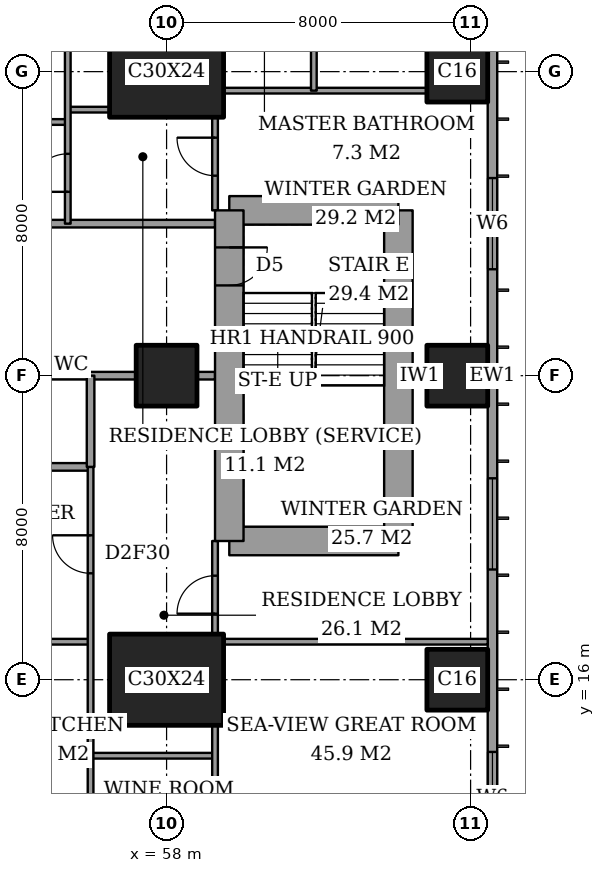
"""IFC4 building model, lengths in metres.
Left out: names, types, materials, properties, quantities, classifications, styles, units other than length and angle.
Written with IfcOpenShell. Run it as: python <this file> out.ifc"""

import sys

from ifc_helpers import new_model, si_unit, direction, frame, frame_2d, origin, origin_2d, place, context, subcontext, project, spatial, rectangle, extrude, element, fill, save


model = new_model("IFC4")
c1 = context("Model", 3, precision=1e-05, world=origin(), true_north=direction((0.0, 1.0)))
c2 = subcontext(c1, "Body", "Model", "MODEL_VIEW")
j1 = project(units=[si_unit("LENGTHUNIT", "METRE"), si_unit("PLANEANGLEUNIT", "RADIAN")], contexts=[c1])
p1 = place(None, origin())
s1 = spatial("IfcSite", under=j1, at=p1, CompositionType="ELEMENT")
p2 = place(p1, origin())
s2 = spatial("IfcBuilding", under=s1, at=p2, CompositionType="ELEMENT")
p3 = place(p2, frame((0.0, 0.0, 273.6)))
s3 = spatial("IfcBuildingStorey", under=s2, at=p3, CompositionType="ELEMENT", Elevation=273.6)
p4 = place(p3, frame((58.0, 16.0, 0.0), z_axis=(0.0, 0.0, 1.0), x_axis=(1.0, 0.0, 0.0)))
e1 = element("IfcColumn", 1, at=p4, inside=s3, PredefinedType="COLUMN", context=c2, shape_type="SweptSolid", body=[
    extrude(rectangle(XDim=3.0, YDim=2.4, at=origin_2d()), origin(), (0.0, 0.0, 1.0), 3.6),
])
p5 = place(p3, frame((58.0, 24.0, 0.0), z_axis=(0.0, 0.0, 1.0), x_axis=(1.0, 0.0, 0.0)))
e2 = element("IfcColumn", 2, at=p5, inside=s3, PredefinedType="COLUMN", context=c2, shape_type="SweptSolid", body=[
    extrude(rectangle(XDim=1.6, YDim=1.6, at=origin_2d()), origin(), (0.0, 0.0, 1.0), 3.6),
])
p6 = place(p3, frame((58.0, 32.0, 0.0), z_axis=(0.0, 0.0, 1.0), x_axis=(1.0, 0.0, 0.0)))
e3 = element("IfcColumn", 3, at=p6, inside=s3, PredefinedType="COLUMN", context=c2, shape_type="SweptSolid", body=[
    extrude(rectangle(XDim=3.0, YDim=2.4, at=origin_2d()), origin(), (0.0, 0.0, 1.0), 3.6),
])
for number, where, z_axis, x_axis in (
    (4, (65.65, 16.0, 0.0), (0.0, 0.0, 1.0), (1.0, 0.0, 0.0)),
    (5, (65.65, 24.0, 0.0), (0.0, 0.0, 1.0), (1.0, 0.0, 0.0)),
    (6, (65.65, 32.0, 0.0), (0.0, 0.0, 1.0), (1.0, 0.0, 0.0)),
):
    element("IfcColumn", number, at=place(p3, frame(where, z_axis=z_axis, x_axis=x_axis)), inside=s3, PredefinedType="COLUMN", context=c2, shape_type="SweptSolid", body=[
        extrude(rectangle(XDim=1.6, YDim=1.6, at=origin_2d()), origin(), (0.0, 0.0, 1.0), 3.6),
    ])
p7 = place(p3, frame((59.65, 19.65, 0.0), z_axis=(0.0, 0.0, 1.0), x_axis=(1.0, 0.0, 0.0)))
e7 = element("IfcWall", 7, at=p7, inside=s3, PredefinedType="SHEAR", context=c2, shape_type="SweptSolid", body=[
    extrude(rectangle(XDim=4.45, YDim=0.75, at=frame_2d((2.225, 0.0))), origin(), (0.0, 0.0, 1.0), 3.6),
])
p8 = place(p3, frame((64.1, 19.65, 0.0), z_axis=(0.0, 0.0, 1.0), x_axis=(0.0, 1.0, 0.0)))
e8 = element("IfcWall", 8, at=p8, inside=s3, PredefinedType="SHEAR", context=c2, shape_type="SweptSolid", body=[
    extrude(rectangle(XDim=8.7, YDim=0.75, at=frame_2d((4.35, 0.0))), origin(), (0.0, 0.0, 1.0), 3.6),
])
p9 = place(p3, frame((64.1, 28.35, 0.0), z_axis=(0.0, 0.0, 1.0), x_axis=(-1.0, 0.0, 0.0)))
e9 = element("IfcWall", 9, at=p9, inside=s3, PredefinedType="SHEAR", context=c2, shape_type="SweptSolid", body=[
    extrude(rectangle(XDim=4.45, YDim=0.75, at=frame_2d((2.225, 0.0))), origin(), (0.0, 0.0, 1.0), 3.6),
])
p10 = place(p3, frame((59.65, 28.35, 0.0), z_axis=(0.0, 0.0, 1.0), x_axis=(0.0, -1.0, 0.0)))
e10 = element("IfcWall", 10, at=p10, inside=s3, PredefinedType="SHEAR", context=c2, shape_type="SweptSolid", body=[
    extrude(rectangle(XDim=8.7, YDim=0.75, at=frame_2d((4.35, 0.0))), origin(), (0.0, 0.0, 1.0), 3.6),
])
p11 = place(p10, frame((0.975, 0.0, 0.0)))
e11 = element("IfcOpeningElement", 11, at=p11, cuts=e10, PredefinedType="OPENING", context=c2, shape_type="SweptSolid", body=[
    extrude(rectangle(XDim=1.0, YDim=2.1, at=frame_2d((0.5, 1.05))), frame((0.0, 0.385, 0.0), z_axis=(0.0, -1.0, 0.0), x_axis=(1.0, 0.0, 0.0)), (0.0, 0.0, 1.0), 0.77),
])
p12 = place(p3, frame((66.575, 3.175, 0.0), z_axis=(0.0, 0.0, 1.0), x_axis=(0.0, 1.0, 0.0)))
e12 = element("IfcWall", 12, at=p12, inside=s3, PredefinedType="SOLIDWALL", context=c2, shape_type="SweptSolid", body=[
    extrude(rectangle(XDim=41.65, YDim=0.25, at=frame_2d((20.825, 0.0))), origin(), (0.0, 0.0, 1.0), 3.6),
])
p13 = place(p12, frame((0.875, 0.0, 0.6)))
e13 = element("IfcOpeningElement", 13, at=p13, cuts=e12, PredefinedType="OPENING", context=c2, shape_type="SweptSolid", body=[
    extrude(rectangle(XDim=2.4, YDim=2.0, at=frame_2d((1.2, 1.0))), frame((0.0, 0.135, 0.0), z_axis=(0.0, -1.0, 0.0), x_axis=(1.0, 0.0, 0.0)), (0.0, 0.0, 1.0), 0.27),
])
p14 = place(p12, frame((6.0, 0.0, 0.6)))
e14 = element("IfcOpeningElement", 14, at=p14, cuts=e12, PredefinedType="OPENING", context=c2, shape_type="SweptSolid", body=[
    extrude(rectangle(XDim=1.2, YDim=2.0, at=frame_2d((0.6, 1.0))), frame((0.0, 0.135, 0.0), z_axis=(0.0, -1.0, 0.0), x_axis=(1.0, 0.0, 0.0)), (0.0, 0.0, 1.0), 0.27),
])
p15 = place(p12, frame((8.525, 0.0, 0.6)))
e15 = element("IfcOpeningElement", 15, at=p15, cuts=e12, PredefinedType="OPENING", context=c2, shape_type="SweptSolid", body=[
    extrude(rectangle(XDim=2.4, YDim=2.0, at=frame_2d((1.2, 1.0))), frame((0.0, 0.135, 0.0), z_axis=(0.0, -1.0, 0.0), x_axis=(1.0, 0.0, 0.0)), (0.0, 0.0, 1.0), 0.27),
])
p16 = place(p12, frame((15.725, 0.0, 0.6)))
e16 = element("IfcOpeningElement", 16, at=p16, cuts=e12, PredefinedType="OPENING", context=c2, shape_type="SweptSolid", body=[
    extrude(rectangle(XDim=2.4, YDim=2.0, at=frame_2d((1.2, 1.0))), frame((0.0, 0.135, 0.0), z_axis=(0.0, -1.0, 0.0), x_axis=(1.0, 0.0, 0.0)), (0.0, 0.0, 1.0), 0.27),
])
p17 = place(p12, frame((23.625, 0.0, 0.6)))
e17 = element("IfcOpeningElement", 17, at=p17, cuts=e12, PredefinedType="OPENING", context=c2, shape_type="SweptSolid", body=[
    extrude(rectangle(XDim=2.4, YDim=2.0, at=frame_2d((1.2, 1.0))), frame((0.0, 0.135, 0.0), z_axis=(0.0, -1.0, 0.0), x_axis=(1.0, 0.0, 0.0)), (0.0, 0.0, 1.0), 0.27),
])
p18 = place(p12, frame((30.725, 0.0, 0.6)))
e18 = element("IfcOpeningElement", 18, at=p18, cuts=e12, PredefinedType="OPENING", context=c2, shape_type="SweptSolid", body=[
    extrude(rectangle(XDim=2.4, YDim=2.0, at=frame_2d((1.2, 1.0))), frame((0.0, 0.135, 0.0), z_axis=(0.0, -1.0, 0.0), x_axis=(1.0, 0.0, 0.0)), (0.0, 0.0, 1.0), 0.27),
])
p19 = place(p12, frame((34.525, 0.0, 0.6)))
e19 = element("IfcOpeningElement", 19, at=p19, cuts=e12, PredefinedType="OPENING", context=c2, shape_type="SweptSolid", body=[
    extrude(rectangle(XDim=1.2, YDim=2.0, at=frame_2d((0.6, 1.0))), frame((0.0, 0.135, 0.0), z_axis=(0.0, -1.0, 0.0), x_axis=(1.0, 0.0, 0.0)), (0.0, 0.0, 1.0), 0.27),
])
p20 = place(p12, frame((38.375, 0.0, 0.6)))
e20 = element("IfcOpeningElement", 20, at=p20, cuts=e12, PredefinedType="OPENING", context=c2, shape_type="SweptSolid", body=[
    extrude(rectangle(XDim=2.4, YDim=2.0, at=frame_2d((1.2, 1.0))), frame((0.0, 0.135, 0.0), z_axis=(0.0, -1.0, 0.0), x_axis=(1.0, 0.0, 0.0)), (0.0, 0.0, 1.0), 0.27),
])
p21 = place(p3, frame((56.0, 14.0, 0.0), z_axis=(0.0, 0.0, 1.0), x_axis=(1.0, 0.0, 0.0)))
e21 = element("IfcWall", 21, at=p21, inside=s3, PredefinedType="PARTITIONING", context=c2, shape_type="SweptSolid", body=[
    extrude(rectangle(XDim=3.275, YDim=0.15, at=frame_2d((1.637, 0.0))), origin(), (0.0, 0.0, 1.0), 3.25),
])
p22 = place(p3, frame((51.6, 17.0, 0.0), z_axis=(0.0, 0.0, 1.0), x_axis=(1.0, 0.0, 0.0)))
e22 = element("IfcWall", 22, at=p22, inside=s3, PredefinedType="PARTITIONING", context=c2, shape_type="SweptSolid", body=[
    extrude(rectangle(XDim=4.4, YDim=0.15, at=frame_2d((2.2, 0.0))), origin(), (0.0, 0.0, 1.0), 3.25),
])
p23 = place(p22, frame((0.6, 0.0, 0.0)))
e23 = element("IfcOpeningElement", 23, at=p23, cuts=e22, PredefinedType="OPENING", context=c2, shape_type="SweptSolid", body=[
    extrude(rectangle(XDim=1.0, YDim=2.1, at=frame_2d((0.5, 1.05))), frame((0.0, 0.085, 0.0), z_axis=(0.0, -1.0, 0.0), x_axis=(1.0, 0.0, 0.0)), (0.0, 0.0, 1.0), 0.17),
])
p24 = place(p3, frame((59.5, 17.0, 0.0), z_axis=(0.0, 0.0, 1.0), x_axis=(1.0, 0.0, 0.0)))
e24 = element("IfcWall", 24, at=p24, inside=s3, PredefinedType="PARTITIONING", context=c2, shape_type="SweptSolid", body=[
    extrude(rectangle(XDim=6.95, YDim=0.15, at=frame_2d((3.475, 0.0))), origin(), (0.0, 0.0, 1.0), 3.25),
])
p25 = place(p3, frame((51.2, 21.6, 0.0), z_axis=(0.0, 0.0, 1.0), x_axis=(1.0, 0.0, 0.0)))
e25 = element("IfcWall", 25, at=p25, inside=s3, PredefinedType="PARTITIONING", context=c2, shape_type="SweptSolid", body=[
    extrude(rectangle(XDim=4.8, YDim=0.2, at=frame_2d((2.4, 0.0))), origin(), (0.0, 0.0, 1.0), 3.25),
])
p26 = place(p25, frame((1.95, 0.0, 0.0)))
e26 = element("IfcOpeningElement", 26, at=p26, cuts=e25, PredefinedType="OPENING", context=c2, shape_type="SweptSolid", body=[
    extrude(rectangle(XDim=0.9, YDim=2.1, at=frame_2d((0.45, 1.05))), frame((0.0, 0.11, 0.0), z_axis=(0.0, -1.0, 0.0), x_axis=(1.0, 0.0, 0.0)), (0.0, 0.0, 1.0), 0.22),
])
p27 = place(p3, frame((50.8, 24.0, 0.0), z_axis=(0.0, 0.0, 1.0), x_axis=(1.0, 0.0, 0.0)))
e27 = element("IfcWall", 27, at=p27, inside=s3, PredefinedType="PARTITIONING", context=c2, shape_type="SweptSolid", body=[
    extrude(rectangle(XDim=6.4, YDim=0.2, at=frame_2d((3.2, 0.0))), origin(), (0.0, 0.0, 1.0), 3.25),
])
p28 = place(p3, frame((58.8, 24.0, 0.0), z_axis=(0.0, 0.0, 1.0), x_axis=(1.0, 0.0, 0.0)))
e28 = element("IfcWall", 28, at=p28, inside=s3, PredefinedType="PARTITIONING", context=c2, shape_type="SweptSolid", body=[
    extrude(rectangle(XDim=0.475, YDim=0.2, at=frame_2d((0.237, 0.0))), origin(), (0.0, 0.0, 1.0), 3.25),
])
p29 = place(p3, frame((64.475, 24.0, 0.0), z_axis=(0.0, 0.0, 1.0), x_axis=(1.0, 0.0, 0.0)))
e29 = element("IfcWall", 29, at=p29, inside=s3, PredefinedType="PARTITIONING", context=c2, shape_type="SweptSolid", body=[
    extrude(rectangle(XDim=0.375, YDim=0.15, at=frame_2d((0.188, 0.0))), origin(), (0.0, 0.0, 1.0), 3.25),
])
p30 = place(p3, frame((42.0, 28.0, 0.0), z_axis=(0.0, 0.0, 1.0), x_axis=(1.0, 0.0, 0.0)))
e30 = element("IfcWall", 30, at=p30, inside=s3, PredefinedType="PARTITIONING", context=c2, shape_type="SweptSolid", body=[
    extrude(rectangle(XDim=17.275, YDim=0.2, at=frame_2d((8.637, 0.0))), origin(), (0.0, 0.0, 1.0), 3.25),
])
p31 = place(p30, frame((9.1, 0.0, 0.0)))
e31 = element("IfcOpeningElement", 31, at=p31, cuts=e30, PredefinedType="OPENING", context=c2, shape_type="SweptSolid", body=[
    extrude(rectangle(XDim=1.2, YDim=2.4, at=frame_2d((0.6, 1.2))), frame((0.0, 0.11, 0.0), z_axis=(0.0, -1.0, 0.0), x_axis=(1.0, 0.0, 0.0)), (0.0, 0.0, 1.0), 0.22),
])
p32 = place(p3, frame((51.6, 30.675, 0.0), z_axis=(0.0, 0.0, 1.0), x_axis=(1.0, 0.0, 0.0)))
e32 = element("IfcWall", 32, at=p32, inside=s3, PredefinedType="PARTITIONING", context=c2, shape_type="SweptSolid", body=[
    extrude(rectangle(XDim=3.8, YDim=0.15, at=frame_2d((1.9, 0.0))), origin(), (0.0, 0.0, 1.0), 3.25),
])
p33 = place(p32, frame((2.2, 0.0, 0.0)))
e33 = element("IfcOpeningElement", 33, at=p33, cuts=e32, PredefinedType="OPENING", context=c2, shape_type="SweptSolid", body=[
    extrude(rectangle(XDim=1.0, YDim=2.1, at=frame_2d((0.5, 1.05))), frame((0.0, 0.085, 0.0), z_axis=(0.0, -1.0, 0.0), x_axis=(1.0, 0.0, 0.0)), (0.0, 0.0, 1.0), 0.17),
])
p34 = place(p3, frame((55.4, 31.0, 0.0), z_axis=(0.0, 0.0, 1.0), x_axis=(1.0, 0.0, 0.0)))
e34 = element("IfcWall", 34, at=p34, inside=s3, PredefinedType="PARTITIONING", context=c2, shape_type="SweptSolid", body=[
    extrude(rectangle(XDim=1.1, YDim=0.15, at=frame_2d((0.55, 0.0))), origin(), (0.0, 0.0, 1.0), 3.25),
])
p35 = place(p3, frame((59.5, 31.5, 0.0), z_axis=(0.0, 0.0, 1.0), x_axis=(1.0, 0.0, 0.0)))
e35 = element("IfcWall", 35, at=p35, inside=s3, PredefinedType="PARTITIONING", context=c2, shape_type="SweptSolid", body=[
    extrude(rectangle(XDim=5.35, YDim=0.15, at=frame_2d((2.675, 0.0))), origin(), (0.0, 0.0, 1.0), 3.25),
])
p36 = place(p3, frame((55.4, 28.0, 0.0), z_axis=(0.0, 0.0, 1.0), x_axis=(0.0, 1.0, 0.0)))
e36 = element("IfcWall", 36, at=p36, inside=s3, PredefinedType="PARTITIONING", context=c2, shape_type="SweptSolid", body=[
    extrude(rectangle(XDim=9.4, YDim=0.15, at=frame_2d((4.7, 0.0))), origin(), (0.0, 0.0, 1.0), 3.25),
])
p37 = place(p36, frame((0.837, 0.0, 0.0)))
e37 = element("IfcOpeningElement", 37, at=p37, cuts=e36, PredefinedType="OPENING", context=c2, shape_type="SweptSolid", body=[
    extrude(rectangle(XDim=1.0, YDim=2.1, at=frame_2d((0.5, 1.05))), frame((0.0, 0.085, 0.0), z_axis=(0.0, -1.0, 0.0), x_axis=(1.0, 0.0, 0.0)), (0.0, 0.0, 1.0), 0.17),
])
p38 = place(p3, frame((56.0, 21.6, 0.0), z_axis=(0.0, 0.0, 1.0), x_axis=(0.0, 1.0, 0.0)))
e38 = element("IfcWall", 38, at=p38, inside=s3, PredefinedType="PARTITIONING", context=c2, shape_type="SweptSolid", body=[
    extrude(rectangle(XDim=2.4, YDim=0.2, at=frame_2d((1.2, 0.0))), origin(), (0.0, 0.0, 1.0), 3.25),
])
p39 = place(p3, frame((56.0, 10.6, 0.0), z_axis=(0.0, 0.0, 1.0), x_axis=(0.0, 1.0, 0.0)))
e39 = element("IfcWall", 39, at=p39, inside=s3, PredefinedType="PARTITIONING", context=c2, shape_type="SweptSolid", body=[
    extrude(rectangle(XDim=11.0, YDim=0.15, at=frame_2d((5.5, 0.0))), origin(), (0.0, 0.0, 1.0), 3.25),
])
p40 = place(p39, frame((8.2, 0.0, 0.0)))
e40 = element("IfcOpeningElement", 40, at=p40, cuts=e39, PredefinedType="OPENING", context=c2, shape_type="SweptSolid", body=[
    extrude(rectangle(XDim=1.0, YDim=2.1, at=frame_2d((0.5, 1.05))), frame((0.0, 0.085, 0.0), z_axis=(0.0, -1.0, 0.0), x_axis=(1.0, 0.0, 0.0)), (0.0, 0.0, 1.0), 0.17),
])
p41 = place(p3, frame((59.275, 10.6, 0.0), z_axis=(0.0, 0.0, 1.0), x_axis=(0.0, 1.0, 0.0)))
e41 = element("IfcWall", 41, at=p41, inside=s3, PredefinedType="PARTITIONING", context=c2, shape_type="SweptSolid", body=[
    extrude(rectangle(XDim=4.2, YDim=0.15, at=frame_2d((2.1, 0.0))), origin(), (0.0, 0.0, 1.0), 3.25),
])
p42 = place(p3, frame((59.275, 17.2, 0.0), z_axis=(0.0, 0.0, 1.0), x_axis=(0.0, 1.0, 0.0)))
e42 = element("IfcWall", 42, at=p42, inside=s3, PredefinedType="PARTITIONING", context=c2, shape_type="SweptSolid", body=[
    extrude(rectangle(XDim=2.45, YDim=0.15, at=frame_2d((1.225, 0.0))), origin(), (0.0, 0.0, 1.0), 3.25),
])
p43 = place(p42, frame((0.538, 0.0, 0.0)))
e43 = element("IfcOpeningElement", 43, at=p43, cuts=e42, PredefinedType="OPENING", context=c2, shape_type="SweptSolid", body=[
    extrude(rectangle(XDim=1.0, YDim=2.1, at=frame_2d((0.5, 1.05))), frame((0.0, 0.085, 0.0), z_axis=(0.0, -1.0, 0.0), x_axis=(1.0, 0.0, 0.0)), (0.0, 0.0, 1.0), 0.17),
])
p44 = place(p3, frame((59.275, 28.35, 0.0), z_axis=(0.0, 0.0, 1.0), x_axis=(0.0, 1.0, 0.0)))
e44 = element("IfcWall", 44, at=p44, inside=s3, PredefinedType="PARTITIONING", context=c2, shape_type="SweptSolid", body=[
    extrude(rectangle(XDim=2.45, YDim=0.15, at=frame_2d((1.225, 0.0))), origin(), (0.0, 0.0, 1.0), 3.25),
])
p45 = place(p44, frame((0.913, 0.0, 0.0)))
e45 = element("IfcOpeningElement", 45, at=p45, cuts=e44, PredefinedType="OPENING", context=c2, shape_type="SweptSolid", body=[
    extrude(rectangle(XDim=1.0, YDim=2.1, at=frame_2d((0.5, 1.05))), frame((0.0, 0.085, 0.0), z_axis=(0.0, -1.0, 0.0), x_axis=(1.0, 0.0, 0.0)), (0.0, 0.0, 1.0), 0.17),
])
p46 = place(p3, frame((61.875, 31.5, 0.0), z_axis=(0.0, 0.0, 1.0), x_axis=(0.0, 1.0, 0.0)))
e46 = element("IfcWall", 46, at=p46, inside=s3, PredefinedType="PARTITIONING", context=c2, shape_type="SweptSolid", body=[
    extrude(rectangle(XDim=2.8, YDim=0.15, at=frame_2d((1.4, 0.0))), origin(), (0.0, 0.0, 1.0), 3.25),
])
p47 = place(p46, frame((1.15, 0.0, 0.0)))
e47 = element("IfcOpeningElement", 47, at=p47, cuts=e46, PredefinedType="OPENING", context=c2, shape_type="SweptSolid", body=[
    extrude(rectangle(XDim=0.9, YDim=2.1, at=frame_2d((0.45, 1.05))), frame((0.0, 0.085, 0.0), z_axis=(0.0, -1.0, 0.0), x_axis=(1.0, 0.0, 0.0)), (0.0, 0.0, 1.0), 0.17),
])
p48 = place(p15, origin())
e48 = element("IfcWindow", 48, at=p48, inside=s3, PartitioningType="SINGLE_PANEL", PredefinedType="WINDOW", context=c2, shape_type="SweptSolid", body=[
    extrude(rectangle(XDim=2.4, YDim=2.0, at=frame_2d((1.2, 1.0))), frame((0.0, 0.03, 0.0), z_axis=(0.0, -1.0, 0.0), x_axis=(1.0, 0.0, 0.0)), (0.0, 0.0, 1.0), 0.06),
])
fill(e15, e48)
p49 = place(p16, origin())
e49 = element("IfcWindow", 49, at=p49, inside=s3, PartitioningType="SINGLE_PANEL", PredefinedType="WINDOW", context=c2, shape_type="SweptSolid", body=[
    extrude(rectangle(XDim=2.4, YDim=2.0, at=frame_2d((1.2, 1.0))), frame((0.0, 0.03, 0.0), z_axis=(0.0, -1.0, 0.0), x_axis=(1.0, 0.0, 0.0)), (0.0, 0.0, 1.0), 0.06),
])
fill(e16, e49)
p50 = place(p17, origin())
e50 = element("IfcWindow", 50, at=p50, inside=s3, PartitioningType="SINGLE_PANEL", PredefinedType="WINDOW", context=c2, shape_type="SweptSolid", body=[
    extrude(rectangle(XDim=2.4, YDim=2.0, at=frame_2d((1.2, 1.0))), frame((0.0, 0.03, 0.0), z_axis=(0.0, -1.0, 0.0), x_axis=(1.0, 0.0, 0.0)), (0.0, 0.0, 1.0), 0.06),
])
fill(e17, e50)
p51 = place(p43, origin())
e51 = element("IfcDoor", 51, at=p51, inside=s3, OperationType="SINGLE_SWING_RIGHT", PredefinedType="DOOR", context=c2, shape_type="SweptSolid", body=[
    extrude(rectangle(XDim=1.0, YDim=2.1, at=frame_2d((0.5, 1.05))), frame((0.0, 0.025, 0.0), z_axis=(0.0, -1.0, 0.0), x_axis=(1.0, 0.0, 0.0)), (0.0, 0.0, 1.0), 0.05),
])
fill(e43, e51)
p52 = place(p40, origin())
e52 = element("IfcDoor", 52, at=p52, inside=s3, OperationType="SINGLE_SWING_LEFT", PredefinedType="DOOR", context=c2, shape_type="SweptSolid", body=[
    extrude(rectangle(XDim=1.0, YDim=2.1, at=frame_2d((0.5, 1.05))), frame((0.0, 0.025, 0.0), z_axis=(0.0, -1.0, 0.0), x_axis=(1.0, 0.0, 0.0)), (0.0, 0.0, 1.0), 0.05),
])
fill(e40, e52)
p53 = place(p45, origin())
e53 = element("IfcDoor", 53, at=p53, inside=s3, OperationType="SINGLE_SWING_LEFT", PredefinedType="DOOR", context=c2, shape_type="SweptSolid", body=[
    extrude(rectangle(XDim=1.0, YDim=2.1, at=frame_2d((0.5, 1.05))), frame((0.0, 0.025, 0.0), z_axis=(0.0, -1.0, 0.0), x_axis=(1.0, 0.0, 0.0)), (0.0, 0.0, 1.0), 0.05),
])
fill(e45, e53)
p54 = place(p37, origin())
e54 = element("IfcDoor", 54, at=p54, inside=s3, OperationType="SINGLE_SWING_RIGHT", PredefinedType="DOOR", context=c2, shape_type="SweptSolid", body=[
    extrude(rectangle(XDim=1.0, YDim=2.1, at=frame_2d((0.5, 1.05))), frame((0.0, 0.025, 0.0), z_axis=(0.0, -1.0, 0.0), x_axis=(1.0, 0.0, 0.0)), (0.0, 0.0, 1.0), 0.05),
])
fill(e37, e54)
p55 = place(p11, origin())
e55 = element("IfcDoor", 55, at=p55, inside=s3, OperationType="SINGLE_SWING_RIGHT", PredefinedType="DOOR", context=c2, shape_type="SweptSolid", body=[
    extrude(rectangle(XDim=1.0, YDim=2.1, at=frame_2d((0.5, 1.05))), frame((0.0, 0.025, 0.0), z_axis=(0.0, -1.0, 0.0), x_axis=(1.0, 0.0, 0.0)), (0.0, 0.0, 1.0), 0.05),
])
fill(e11, e55)
save(model, sys.argv[1])
